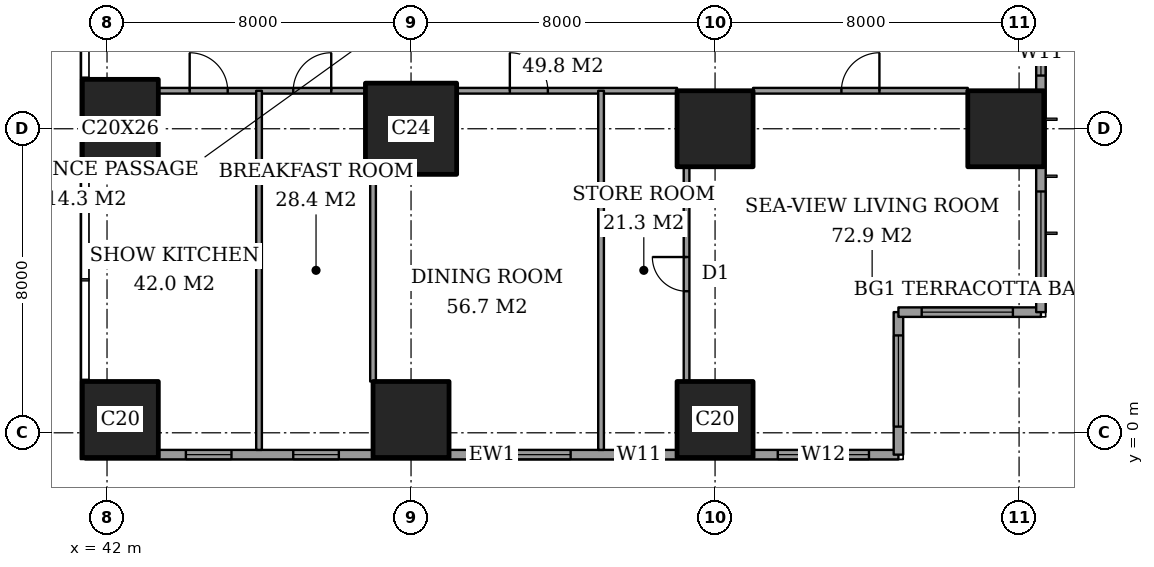
"""IFC4 building model, lengths in metres.
Left out: names, types, materials, properties, quantities, classifications, styles, units other than length and angle.
Written with IfcOpenShell. Run it as: python <this file> out.ifc"""

import sys

from ifc_helpers import new_model, si_unit, direction, frame, frame_2d, origin, origin_2d, place, context, subcontext, project, spatial, rectangle, extrude, element, fill, save


model = new_model("IFC4")
c1 = context("Model", 3, precision=1e-05, world=origin(), true_north=direction((0.0, 1.0)))
c2 = subcontext(c1, "Body", "Model", "MODEL_VIEW")
j1 = project(units=[si_unit("LENGTHUNIT", "METRE"), si_unit("PLANEANGLEUNIT", "RADIAN")], contexts=[c1])
p1 = place(None, origin())
s1 = spatial("IfcSite", under=j1, at=p1, CompositionType="ELEMENT")
p2 = place(p1, origin())
s2 = spatial("IfcBuilding", under=s1, at=p2, CompositionType="ELEMENT")
p3 = place(p2, frame((0.0, 0.0, 157.4)))
s3 = spatial("IfcBuildingStorey", under=s2, at=p3, CompositionType="ELEMENT", Elevation=157.4)
p4 = place(p3, frame((42.35, 0.35, 0.0), z_axis=(0.0, 0.0, 1.0), x_axis=(1.0, 0.0, 0.0)))
e1 = element("IfcColumn", 1, at=p4, inside=s3, PredefinedType="COLUMN", context=c2, shape_type="SweptSolid", body=[
    extrude(rectangle(XDim=2.0, YDim=2.0, at=origin_2d()), origin(), (0.0, 0.0, 1.0), 3.6),
])
p5 = place(p3, frame((42.35, 8.0, 0.0), z_axis=(0.0, 0.0, 1.0), x_axis=(1.0, 0.0, 0.0)))
e2 = element("IfcColumn", 2, at=p5, inside=s3, PredefinedType="COLUMN", context=c2, shape_type="SweptSolid", body=[
    extrude(rectangle(XDim=2.0, YDim=2.6, at=origin_2d()), origin(), (0.0, 0.0, 1.0), 3.6),
])
p6 = place(p3, frame((50.0, 0.35, 0.0), z_axis=(0.0, 0.0, 1.0), x_axis=(1.0, 0.0, 0.0)))
e3 = element("IfcColumn", 3, at=p6, inside=s3, PredefinedType="COLUMN", context=c2, shape_type="SweptSolid", body=[
    extrude(rectangle(XDim=2.0, YDim=2.0, at=origin_2d()), origin(), (0.0, 0.0, 1.0), 3.6),
])
p7 = place(p3, frame((50.0, 8.0, 0.0), z_axis=(0.0, 0.0, 1.0), x_axis=(1.0, 0.0, 0.0)))
e4 = element("IfcColumn", 4, at=p7, inside=s3, PredefinedType="COLUMN", context=c2, shape_type="SweptSolid", body=[
    extrude(rectangle(XDim=2.4, YDim=2.4, at=origin_2d()), origin(), (0.0, 0.0, 1.0), 3.6),
])
for number, where, z_axis, x_axis in (
    (5, (58.0, 0.35, 0.0), (0.0, 0.0, 1.0), (1.0, 0.0, 0.0)),
    (6, (58.0, 8.0, 0.0), (0.0, 0.0, 1.0), (1.0, 0.0, 0.0)),
    (7, (65.65, 8.0, 0.0), (0.0, 0.0, 1.0), (1.0, 0.0, 0.0)),
):
    element("IfcColumn", number, at=place(p3, frame(where, z_axis=z_axis, x_axis=x_axis)), inside=s3, PredefinedType="COLUMN", context=c2, shape_type="SweptSolid", body=[
        extrude(rectangle(XDim=2.0, YDim=2.0, at=origin_2d()), origin(), (0.0, 0.0, 1.0), 3.6),
    ])
p8 = place(p3, frame((41.425, -0.575, 0.0), z_axis=(0.0, 0.0, 1.0), x_axis=(1.0, 0.0, 0.0)))
e8 = element("IfcWall", 8, at=p8, inside=s3, PredefinedType="SOLIDWALL", context=c2, shape_type="SweptSolid", body=[
    extrude(rectangle(XDim=21.4, YDim=0.25, at=frame_2d((10.7, 0.0))), origin(), (0.0, 0.0, 1.0), 3.6),
])
p9 = place(p8, frame((2.65, 0.0, 0.4)))
e9 = element("IfcOpeningElement", 9, at=p9, cuts=e8, PredefinedType="OPENING", context=c2, shape_type="SweptSolid", body=[
    extrude(rectangle(XDim=1.2, YDim=2.2, at=frame_2d((0.6, 1.1))), frame((0.0, 0.135, 0.0), z_axis=(0.0, -1.0, 0.0), x_axis=(1.0, 0.0, 0.0)), (0.0, 0.0, 1.0), 0.27),
])
p10 = place(p8, frame((5.475, 0.0, 0.4)))
e10 = element("IfcOpeningElement", 10, at=p10, cuts=e8, PredefinedType="OPENING", context=c2, shape_type="SweptSolid", body=[
    extrude(rectangle(XDim=1.2, YDim=2.2, at=frame_2d((0.6, 1.1))), frame((0.0, 0.135, 0.0), z_axis=(0.0, -1.0, 0.0), x_axis=(1.0, 0.0, 0.0)), (0.0, 0.0, 1.0), 0.27),
])
p11 = place(p8, frame((10.375, 0.0, 0.4)))
e11 = element("IfcOpeningElement", 11, at=p11, cuts=e8, PredefinedType="OPENING", context=c2, shape_type="SweptSolid", body=[
    extrude(rectangle(XDim=2.4, YDim=2.2, at=frame_2d((1.2, 1.1))), frame((0.0, 0.135, 0.0), z_axis=(0.0, -1.0, 0.0), x_axis=(1.0, 0.0, 0.0)), (0.0, 0.0, 1.0), 0.27),
])
p12 = place(p8, frame((13.975, 0.0, 0.4)))
e12 = element("IfcOpeningElement", 12, at=p12, cuts=e8, PredefinedType="OPENING", context=c2, shape_type="SweptSolid", body=[
    extrude(rectangle(XDim=1.2, YDim=2.2, at=frame_2d((0.6, 1.1))), frame((0.0, 0.135, 0.0), z_axis=(0.0, -1.0, 0.0), x_axis=(1.0, 0.0, 0.0)), (0.0, 0.0, 1.0), 0.27),
])
p13 = place(p8, frame((18.225, 0.0, 0.4)))
e13 = element("IfcOpeningElement", 13, at=p13, cuts=e8, PredefinedType="OPENING", context=c2, shape_type="SweptSolid", body=[
    extrude(rectangle(XDim=2.4, YDim=2.2, at=frame_2d((1.2, 1.1))), frame((0.0, 0.135, 0.0), z_axis=(0.0, -1.0, 0.0), x_axis=(1.0, 0.0, 0.0)), (0.0, 0.0, 1.0), 0.27),
])
p14 = place(p3, frame((62.825, -0.575, 0.0), z_axis=(0.0, 0.0, 1.0), x_axis=(0.0, 1.0, 0.0)))
e14 = element("IfcWall", 14, at=p14, inside=s3, PredefinedType="SOLIDWALL", context=c2, shape_type="SweptSolid", body=[
    extrude(rectangle(XDim=3.75, YDim=0.25, at=frame_2d((1.875, 0.0))), origin(), (0.0, 0.0, 1.0), 3.6),
])
p15 = place(p14, frame((0.738, 0.0, 0.4)))
e15 = element("IfcOpeningElement", 15, at=p15, cuts=e14, PredefinedType="OPENING", context=c2, shape_type="SweptSolid", body=[
    extrude(rectangle(XDim=2.4, YDim=2.2, at=frame_2d((1.2, 1.1))), frame((0.0, 0.135, 0.0), z_axis=(0.0, -1.0, 0.0), x_axis=(1.0, 0.0, 0.0)), (0.0, 0.0, 1.0), 0.27),
])
p16 = place(p3, frame((62.825, 3.175, 0.0), z_axis=(0.0, 0.0, 1.0), x_axis=(1.0, 0.0, 0.0)))
e16 = element("IfcWall", 16, at=p16, inside=s3, PredefinedType="SOLIDWALL", context=c2, shape_type="SweptSolid", body=[
    extrude(rectangle(XDim=3.75, YDim=0.25, at=frame_2d((1.875, 0.0))), origin(), (0.0, 0.0, 1.0), 3.6),
])
p17 = place(p16, frame((0.613, 0.0, 0.4)))
e17 = element("IfcOpeningElement", 17, at=p17, cuts=e16, PredefinedType="OPENING", context=c2, shape_type="SweptSolid", body=[
    extrude(rectangle(XDim=2.4, YDim=2.2, at=frame_2d((1.2, 1.1))), frame((0.0, 0.135, 0.0), z_axis=(0.0, -1.0, 0.0), x_axis=(1.0, 0.0, 0.0)), (0.0, 0.0, 1.0), 0.27),
])
p18 = place(p3, frame((66.575, 3.175, 0.0), z_axis=(0.0, 0.0, 1.0), x_axis=(0.0, 1.0, 0.0)))
e18 = element("IfcWall", 18, at=p18, inside=s3, PredefinedType="SOLIDWALL", context=c2, shape_type="SweptSolid", body=[
    extrude(rectangle(XDim=41.65, YDim=0.25, at=frame_2d((20.825, 0.0))), origin(), (0.0, 0.0, 1.0), 3.6),
])
p19 = place(p18, frame((0.775, 0.0, 0.4)))
e19 = element("IfcOpeningElement", 19, at=p19, cuts=e18, PredefinedType="OPENING", context=c2, shape_type="SweptSolid", body=[
    extrude(rectangle(XDim=2.4, YDim=2.2, at=frame_2d((1.2, 1.1))), frame((0.0, 0.135, 0.0), z_axis=(0.0, -1.0, 0.0), x_axis=(1.0, 0.0, 0.0)), (0.0, 0.0, 1.0), 0.27),
])
p20 = place(p18, frame((6.225, 0.0, 0.4)))
e20 = element("IfcOpeningElement", 20, at=p20, cuts=e18, PredefinedType="OPENING", context=c2, shape_type="SweptSolid", body=[
    extrude(rectangle(XDim=1.2, YDim=2.2, at=frame_2d((0.6, 1.1))), frame((0.0, 0.135, 0.0), z_axis=(0.0, -1.0, 0.0), x_axis=(1.0, 0.0, 0.0)), (0.0, 0.0, 1.0), 0.27),
])
p21 = place(p18, frame((8.475, 0.0, 0.4)))
e21 = element("IfcOpeningElement", 21, at=p21, cuts=e18, PredefinedType="OPENING", context=c2, shape_type="SweptSolid", body=[
    extrude(rectangle(XDim=2.4, YDim=2.2, at=frame_2d((1.2, 1.1))), frame((0.0, 0.135, 0.0), z_axis=(0.0, -1.0, 0.0), x_axis=(1.0, 0.0, 0.0)), (0.0, 0.0, 1.0), 0.27),
])
p22 = place(p18, frame((15.775, 0.0, 0.4)))
e22 = element("IfcOpeningElement", 22, at=p22, cuts=e18, PredefinedType="OPENING", context=c2, shape_type="SweptSolid", body=[
    extrude(rectangle(XDim=2.4, YDim=2.2, at=frame_2d((1.2, 1.1))), frame((0.0, 0.135, 0.0), z_axis=(0.0, -1.0, 0.0), x_axis=(1.0, 0.0, 0.0)), (0.0, 0.0, 1.0), 0.27),
])
p23 = place(p18, frame((23.475, 0.0, 0.4)))
e23 = element("IfcOpeningElement", 23, at=p23, cuts=e18, PredefinedType="OPENING", context=c2, shape_type="SweptSolid", body=[
    extrude(rectangle(XDim=2.4, YDim=2.2, at=frame_2d((1.2, 1.1))), frame((0.0, 0.135, 0.0), z_axis=(0.0, -1.0, 0.0), x_axis=(1.0, 0.0, 0.0)), (0.0, 0.0, 1.0), 0.27),
])
p24 = place(p18, frame((30.975, 0.0, 0.4)))
e24 = element("IfcOpeningElement", 24, at=p24, cuts=e18, PredefinedType="OPENING", context=c2, shape_type="SweptSolid", body=[
    extrude(rectangle(XDim=2.4, YDim=2.2, at=frame_2d((1.2, 1.1))), frame((0.0, 0.135, 0.0), z_axis=(0.0, -1.0, 0.0), x_axis=(1.0, 0.0, 0.0)), (0.0, 0.0, 1.0), 0.27),
])
p25 = place(p18, frame((34.5, 0.0, 0.4)))
e25 = element("IfcOpeningElement", 25, at=p25, cuts=e18, PredefinedType="OPENING", context=c2, shape_type="SweptSolid", body=[
    extrude(rectangle(XDim=1.2, YDim=2.2, at=frame_2d((0.6, 1.1))), frame((0.0, 0.135, 0.0), z_axis=(0.0, -1.0, 0.0), x_axis=(1.0, 0.0, 0.0)), (0.0, 0.0, 1.0), 0.27),
])
p26 = place(p18, frame((38.475, 0.0, 0.4)))
e26 = element("IfcOpeningElement", 26, at=p26, cuts=e18, PredefinedType="OPENING", context=c2, shape_type="SweptSolid", body=[
    extrude(rectangle(XDim=2.4, YDim=2.2, at=frame_2d((1.2, 1.1))), frame((0.0, 0.135, 0.0), z_axis=(0.0, -1.0, 0.0), x_axis=(1.0, 0.0, 0.0)), (0.0, 0.0, 1.0), 0.27),
])
p27 = place(p3, frame((43.35, 9.0, 0.0), z_axis=(0.0, 0.0, 1.0), x_axis=(1.0, 0.0, 0.0)))
e27 = element("IfcWall", 27, at=p27, inside=s3, PredefinedType="PARTITIONING", context=c2, shape_type="SweptSolid", body=[
    extrude(rectangle(XDim=5.45, YDim=0.15, at=frame_2d((2.725, 0.0))), origin(), (0.0, 0.0, 1.0), 3.35),
])
p28 = place(p27, frame((3.55, 0.0, 0.0)))
e28 = element("IfcOpeningElement", 28, at=p28, cuts=e27, PredefinedType="OPENING", context=c2, shape_type="SweptSolid", body=[
    extrude(rectangle(XDim=1.0, YDim=2.1, at=frame_2d((0.5, 1.05))), frame((0.0, 0.085, 0.0), z_axis=(0.0, -1.0, 0.0), x_axis=(1.0, 0.0, 0.0)), (0.0, 0.0, 1.0), 0.17),
])
p29 = place(p27, frame((0.825, 0.0, 0.0)))
e29 = element("IfcOpeningElement", 29, at=p29, cuts=e27, PredefinedType="OPENING", context=c2, shape_type="SweptSolid", body=[
    extrude(rectangle(XDim=1.0, YDim=2.1, at=frame_2d((0.5, 1.05))), frame((0.0, 0.085, 0.0), z_axis=(0.0, -1.0, 0.0), x_axis=(1.0, 0.0, 0.0)), (0.0, 0.0, 1.0), 0.17),
])
p30 = place(p3, frame((51.2, 9.0, 0.0), z_axis=(0.0, 0.0, 1.0), x_axis=(1.0, 0.0, 0.0)))
e30 = element("IfcWall", 30, at=p30, inside=s3, PredefinedType="PARTITIONING", context=c2, shape_type="SweptSolid", body=[
    extrude(rectangle(XDim=5.8, YDim=0.15, at=frame_2d((2.9, 0.0))), origin(), (0.0, 0.0, 1.0), 3.35),
])
p31 = place(p30, frame((1.4, 0.0, 0.0)))
e31 = element("IfcOpeningElement", 31, at=p31, cuts=e30, PredefinedType="OPENING", context=c2, shape_type="SweptSolid", body=[
    extrude(rectangle(XDim=1.0, YDim=2.1, at=frame_2d((0.5, 1.05))), frame((0.0, 0.085, 0.0), z_axis=(0.0, -1.0, 0.0), x_axis=(1.0, 0.0, 0.0)), (0.0, 0.0, 1.0), 0.17),
])
p32 = place(p3, frame((59.0, 9.0, 0.0), z_axis=(0.0, 0.0, 1.0), x_axis=(1.0, 0.0, 0.0)))
e32 = element("IfcWall", 32, at=p32, inside=s3, PredefinedType="PARTITIONING", context=c2, shape_type="SweptSolid", body=[
    extrude(rectangle(XDim=5.65, YDim=0.15, at=frame_2d((2.825, 0.0))), origin(), (0.0, 0.0, 1.0), 3.35),
])
p33 = place(p32, frame((2.325, 0.0, 0.0)))
e33 = element("IfcOpeningElement", 33, at=p33, cuts=e32, PredefinedType="OPENING", context=c2, shape_type="SweptSolid", body=[
    extrude(rectangle(XDim=1.0, YDim=2.1, at=frame_2d((0.5, 1.05))), frame((0.0, 0.085, 0.0), z_axis=(0.0, -1.0, 0.0), x_axis=(1.0, 0.0, 0.0)), (0.0, 0.0, 1.0), 0.17),
])
p34 = place(p3, frame((46.0, -0.45, 0.0), z_axis=(0.0, 0.0, 1.0), x_axis=(0.0, 1.0, 0.0)))
e34 = element("IfcWall", 34, at=p34, inside=s3, PredefinedType="PARTITIONING", context=c2, shape_type="SweptSolid", body=[
    extrude(rectangle(XDim=9.45, YDim=0.15, at=frame_2d((4.725, 0.0))), origin(), (0.0, 0.0, 1.0), 3.35),
])
p35 = place(p3, frame((49.0, 1.35, 0.0), z_axis=(0.0, 0.0, 1.0), x_axis=(0.0, 1.0, 0.0)))
e35 = element("IfcWall", 35, at=p35, inside=s3, PredefinedType="PARTITIONING", context=c2, shape_type="SweptSolid", body=[
    extrude(rectangle(XDim=5.45, YDim=0.15, at=frame_2d((2.725, 0.0))), origin(), (0.0, 0.0, 1.0), 3.35),
])
p36 = place(p3, frame((55.0, -0.45, 0.0), z_axis=(0.0, 0.0, 1.0), x_axis=(0.0, 1.0, 0.0)))
e36 = element("IfcWall", 36, at=p36, inside=s3, PredefinedType="PARTITIONING", context=c2, shape_type="SweptSolid", body=[
    extrude(rectangle(XDim=9.45, YDim=0.15, at=frame_2d((4.725, 0.0))), origin(), (0.0, 0.0, 1.0), 3.35),
])
p37 = place(p3, frame((57.25, 1.35, 0.0), z_axis=(0.0, 0.0, 1.0), x_axis=(0.0, 1.0, 0.0)))
e37 = element("IfcWall", 37, at=p37, inside=s3, PredefinedType="PARTITIONING", context=c2, shape_type="SweptSolid", body=[
    extrude(rectangle(XDim=5.65, YDim=0.15, at=frame_2d((2.825, 0.0))), origin(), (0.0, 0.0, 1.0), 3.35),
])
p38 = place(p37, frame((2.375, 0.0, 0.0)))
e38 = element("IfcOpeningElement", 38, at=p38, cuts=e37, PredefinedType="OPENING", context=c2, shape_type="SweptSolid", body=[
    extrude(rectangle(XDim=0.9, YDim=2.1, at=frame_2d((0.45, 1.05))), frame((0.0, 0.085, 0.0), z_axis=(0.0, -1.0, 0.0), x_axis=(1.0, 0.0, 0.0)), (0.0, 0.0, 1.0), 0.17),
])
p39 = place(p9, origin())
e39 = element("IfcWindow", 39, at=p39, inside=s3, PartitioningType="SINGLE_PANEL", PredefinedType="WINDOW", context=c2, shape_type="SweptSolid", body=[
    extrude(rectangle(XDim=1.2, YDim=2.2, at=frame_2d((0.6, 1.1))), frame((0.0, 0.03, 0.0), z_axis=(0.0, -1.0, 0.0), x_axis=(1.0, 0.0, 0.0)), (0.0, 0.0, 1.0), 0.06),
])
fill(e9, e39)
p40 = place(p10, origin())
e40 = element("IfcWindow", 40, at=p40, inside=s3, PartitioningType="SINGLE_PANEL", PredefinedType="WINDOW", context=c2, shape_type="SweptSolid", body=[
    extrude(rectangle(XDim=1.2, YDim=2.2, at=frame_2d((0.6, 1.1))), frame((0.0, 0.03, 0.0), z_axis=(0.0, -1.0, 0.0), x_axis=(1.0, 0.0, 0.0)), (0.0, 0.0, 1.0), 0.06),
])
fill(e10, e40)
p41 = place(p11, origin())
e41 = element("IfcWindow", 41, at=p41, inside=s3, PartitioningType="SINGLE_PANEL", PredefinedType="WINDOW", context=c2, shape_type="SweptSolid", body=[
    extrude(rectangle(XDim=2.4, YDim=2.2, at=frame_2d((1.2, 1.1))), frame((0.0, 0.03, 0.0), z_axis=(0.0, -1.0, 0.0), x_axis=(1.0, 0.0, 0.0)), (0.0, 0.0, 1.0), 0.06),
])
fill(e11, e41)
p42 = place(p12, origin())
e42 = element("IfcWindow", 42, at=p42, inside=s3, PartitioningType="SINGLE_PANEL", PredefinedType="WINDOW", context=c2, shape_type="SweptSolid", body=[
    extrude(rectangle(XDim=1.2, YDim=2.2, at=frame_2d((0.6, 1.1))), frame((0.0, 0.03, 0.0), z_axis=(0.0, -1.0, 0.0), x_axis=(1.0, 0.0, 0.0)), (0.0, 0.0, 1.0), 0.06),
])
fill(e12, e42)
p43 = place(p13, origin())
e43 = element("IfcWindow", 43, at=p43, inside=s3, PartitioningType="SINGLE_PANEL", PredefinedType="WINDOW", context=c2, shape_type="SweptSolid", body=[
    extrude(rectangle(XDim=2.4, YDim=2.2, at=frame_2d((1.2, 1.1))), frame((0.0, 0.03, 0.0), z_axis=(0.0, -1.0, 0.0), x_axis=(1.0, 0.0, 0.0)), (0.0, 0.0, 1.0), 0.06),
])
fill(e13, e43)
p44 = place(p15, origin())
e44 = element("IfcWindow", 44, at=p44, inside=s3, PartitioningType="SINGLE_PANEL", PredefinedType="WINDOW", context=c2, shape_type="SweptSolid", body=[
    extrude(rectangle(XDim=2.4, YDim=2.2, at=frame_2d((1.2, 1.1))), frame((0.0, 0.03, 0.0), z_axis=(0.0, -1.0, 0.0), x_axis=(1.0, 0.0, 0.0)), (0.0, 0.0, 1.0), 0.06),
])
fill(e15, e44)
p45 = place(p17, origin())
e45 = element("IfcWindow", 45, at=p45, inside=s3, PartitioningType="SINGLE_PANEL", PredefinedType="WINDOW", context=c2, shape_type="SweptSolid", body=[
    extrude(rectangle(XDim=2.4, YDim=2.2, at=frame_2d((1.2, 1.1))), frame((0.0, 0.03, 0.0), z_axis=(0.0, -1.0, 0.0), x_axis=(1.0, 0.0, 0.0)), (0.0, 0.0, 1.0), 0.06),
])
fill(e17, e45)
p46 = place(p19, origin())
e46 = element("IfcWindow", 46, at=p46, inside=s3, PartitioningType="SINGLE_PANEL", PredefinedType="WINDOW", context=c2, shape_type="SweptSolid", body=[
    extrude(rectangle(XDim=2.4, YDim=2.2, at=frame_2d((1.2, 1.1))), frame((0.0, 0.03, 0.0), z_axis=(0.0, -1.0, 0.0), x_axis=(1.0, 0.0, 0.0)), (0.0, 0.0, 1.0), 0.06),
])
fill(e19, e46)
p47 = place(p20, origin())
e47 = element("IfcWindow", 47, at=p47, inside=s3, PartitioningType="SINGLE_PANEL", PredefinedType="WINDOW", context=c2, shape_type="SweptSolid", body=[
    extrude(rectangle(XDim=1.2, YDim=2.2, at=frame_2d((0.6, 1.1))), frame((0.0, 0.03, 0.0), z_axis=(0.0, -1.0, 0.0), x_axis=(1.0, 0.0, 0.0)), (0.0, 0.0, 1.0), 0.06),
])
fill(e20, e47)
p48 = place(p33, origin())
e48 = element("IfcDoor", 48, at=p48, inside=s3, OperationType="SINGLE_SWING_LEFT", PredefinedType="DOOR", context=c2, shape_type="SweptSolid", body=[
    extrude(rectangle(XDim=1.0, YDim=2.1, at=frame_2d((0.5, 1.05))), frame((0.0, 0.025, 0.0), z_axis=(0.0, -1.0, 0.0), x_axis=(1.0, 0.0, 0.0)), (0.0, 0.0, 1.0), 0.05),
])
fill(e33, e48)
p49 = place(p38, origin())
e49 = element("IfcDoor", 49, at=p49, inside=s3, OperationType="SINGLE_SWING_LEFT", PredefinedType="DOOR", context=c2, shape_type="SweptSolid", body=[
    extrude(rectangle(XDim=0.9, YDim=2.1, at=frame_2d((0.45, 1.05))), frame((0.0, 0.025, 0.0), z_axis=(0.0, -1.0, 0.0), x_axis=(1.0, 0.0, 0.0)), (0.0, 0.0, 1.0), 0.05),
])
fill(e38, e49)
p50 = place(p31, origin())
e50 = element("IfcDoor", 50, at=p50, inside=s3, OperationType="SINGLE_SWING_RIGHT", PredefinedType="DOOR", context=c2, shape_type="SweptSolid", body=[
    extrude(rectangle(XDim=1.0, YDim=2.1, at=frame_2d((0.5, 1.05))), frame((0.0, 0.025, 0.0), z_axis=(0.0, -1.0, 0.0), x_axis=(1.0, 0.0, 0.0)), (0.0, 0.0, 1.0), 0.05),
])
fill(e31, e50)
p51 = place(p28, origin())
e51 = element("IfcDoor", 51, at=p51, inside=s3, OperationType="SINGLE_SWING_LEFT", PredefinedType="DOOR", context=c2, shape_type="SweptSolid", body=[
    extrude(rectangle(XDim=1.0, YDim=2.1, at=frame_2d((0.5, 1.05))), frame((0.0, 0.025, 0.0), z_axis=(0.0, -1.0, 0.0), x_axis=(1.0, 0.0, 0.0)), (0.0, 0.0, 1.0), 0.05),
])
fill(e28, e51)
p52 = place(p29, origin())
e52 = element("IfcDoor", 52, at=p52, inside=s3, OperationType="SINGLE_SWING_RIGHT", PredefinedType="DOOR", context=c2, shape_type="SweptSolid", body=[
    extrude(rectangle(XDim=1.0, YDim=2.1, at=frame_2d((0.5, 1.05))), frame((0.0, 0.025, 0.0), z_axis=(0.0, -1.0, 0.0), x_axis=(1.0, 0.0, 0.0)), (0.0, 0.0, 1.0), 0.05),
])
fill(e29, e52)
save(model, sys.argv[1])
